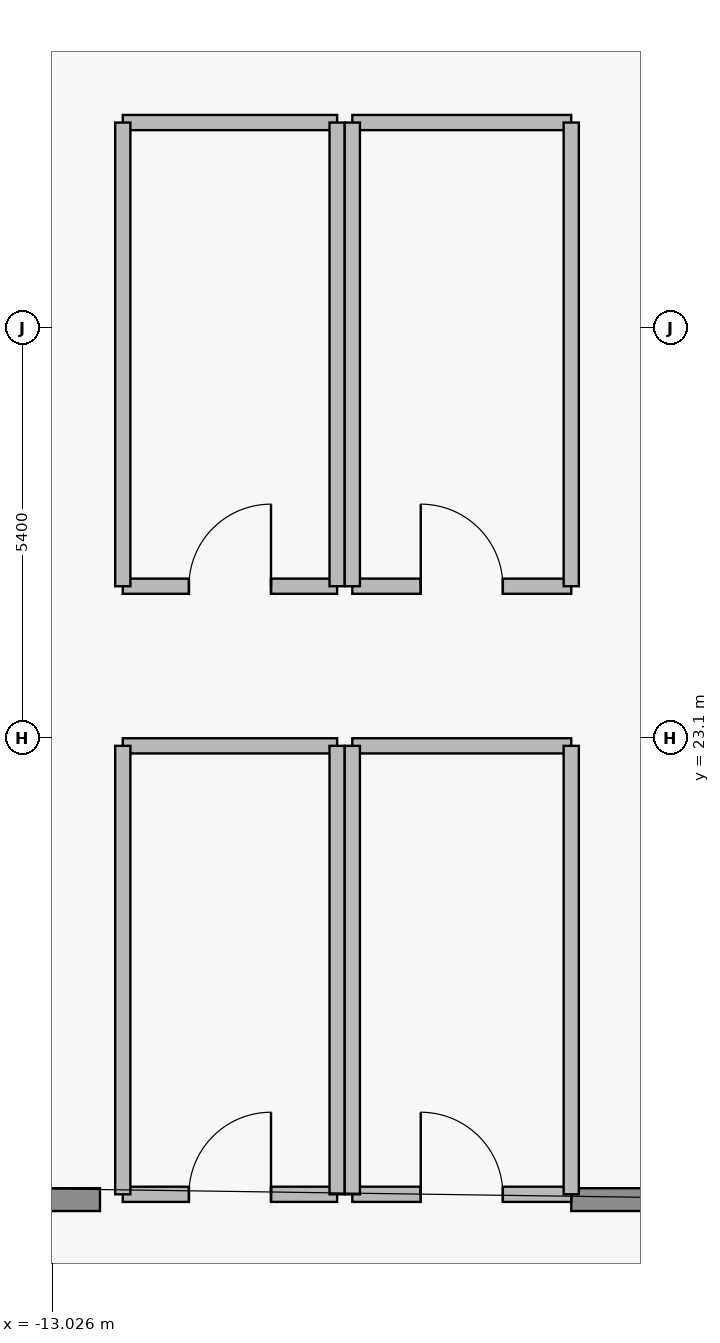
"""IFC4 building model, lengths in metres.
Left out: names, types, materials, properties, quantities, classifications, styles, units other than length and angle.
Written with IfcOpenShell. Run it as: python <this file> out.ifc"""

import sys

from ifc_helpers import new_model, si_unit, direction, frame, frame_2d, origin, place, context, subcontext, project, spatial, rectangle, extrude, element, fill, save


model = new_model("IFC4")
c1 = context("Model", 3, precision=1e-05, world=origin(), true_north=direction((0.0, 1.0)))
c2 = subcontext(c1, "Body", "Model", "MODEL_VIEW")
j1 = project(units=[si_unit("LENGTHUNIT", "METRE"), si_unit("PLANEANGLEUNIT", "RADIAN")], contexts=[c1])
p1 = place(None, origin())
s1 = spatial("IfcSite", under=j1, at=p1, CompositionType="ELEMENT")
p2 = place(p1, origin())
s2 = spatial("IfcBuilding", under=s1, at=p2, CompositionType="ELEMENT")
p3 = place(p2, frame((0.0, 0.0, 233.65)))
s3 = spatial("IfcBuildingStorey", under=s2, at=p3, CompositionType="ELEMENT", Elevation=233.65)
p4 = place(p3, frame((-15.5, 17.03, 0.0), z_axis=(0.0, 0.0, 1.0), x_axis=(1.0, 0.0, 0.0)))
e1 = element("IfcWall", 1, at=p4, inside=s3, PredefinedType="STANDARD", context=c2, shape_type="SweptSolid", body=[
    extrude(rectangle(XDim=3.1, YDim=0.3, at=frame_2d((1.55, 0.0))), origin(), (0.0, 0.0, 1.0), 5.74),
])
p5 = place(p3, frame((-6.2, 17.03, 0.0), z_axis=(0.0, 0.0, 1.0), x_axis=(1.0, 0.0, 0.0)))
e2 = element("IfcWall", 2, at=p5, inside=s3, PredefinedType="STANDARD", context=c2, shape_type="SweptSolid", body=[
    extrude(rectangle(XDim=5.15, YDim=0.3, at=frame_2d((2.575, 0.0))), origin(), (0.0, 0.0, 1.0), 5.74),
])
p6 = place(p5, frame((2.5, 0.0, 0.0)))
e3 = element("IfcOpeningElement", 3, at=p6, cuts=e2, PredefinedType="OPENING", context=c2, shape_type="SweptSolid", body=[
    extrude(rectangle(XDim=1.2, YDim=2.2, at=frame_2d((0.6, 1.1))), frame((0.0, 0.16, 0.0), z_axis=(0.0, -1.0, 0.0), x_axis=(1.0, 0.0, 0.0)), (0.0, 0.0, 1.0), 0.32),
])
p7 = place(p3, frame((-12.1, 17.1, 0.0), z_axis=(0.0, 0.0, 1.0), x_axis=(1.0, 0.0, 0.0)))
e4 = element("IfcWall", 4, at=p7, inside=s3, PredefinedType="PARTITIONING", context=c2, shape_type="SweptSolid", body=[
    extrude(rectangle(XDim=2.82, YDim=0.2, at=frame_2d((1.41, 0.0))), origin(), (0.0, 0.0, 1.0), 5.74),
])
p8 = place(p7, frame((0.87, 0.0, 0.0)))
e5 = element("IfcOpeningElement", 5, at=p8, cuts=e4, PredefinedType="OPENING", context=c2, shape_type="SweptSolid", body=[
    extrude(rectangle(XDim=1.08, YDim=2.18, at=frame_2d((0.54, 1.09))), frame((0.0, 0.11, 0.0), z_axis=(0.0, -1.0, 0.0), x_axis=(1.0, 0.0, 0.0)), (0.0, 0.0, 1.0), 0.22),
])
p9 = place(p3, frame((-9.08, 17.1, 0.0), z_axis=(0.0, 0.0, 1.0), x_axis=(1.0, 0.0, 0.0)))
e6 = element("IfcWall", 6, at=p9, inside=s3, PredefinedType="PARTITIONING", context=c2, shape_type="SweptSolid", body=[
    extrude(rectangle(XDim=2.88, YDim=0.2, at=frame_2d((1.44, 0.0))), origin(), (0.0, 0.0, 1.0), 5.74),
])
p10 = place(p9, frame((0.9, 0.0, 0.0)))
e7 = element("IfcOpeningElement", 7, at=p10, cuts=e6, PredefinedType="OPENING", context=c2, shape_type="SweptSolid", body=[
    extrude(rectangle(XDim=1.08, YDim=2.18, at=frame_2d((0.54, 1.09))), frame((0.0, 0.11, 0.0), z_axis=(0.0, -1.0, 0.0), x_axis=(1.0, 0.0, 0.0)), (0.0, 0.0, 1.0), 0.22),
])
p11 = place(p3, frame((-12.1, 25.1, 0.0), z_axis=(0.0, 0.0, 1.0), x_axis=(1.0, 0.0, 0.0)))
e8 = element("IfcWall", 8, at=p11, inside=s3, PredefinedType="PARTITIONING", context=c2, shape_type="SweptSolid", body=[
    extrude(rectangle(XDim=2.82, YDim=0.2, at=frame_2d((1.41, 0.0))), origin(), (0.0, 0.0, 1.0), 5.336),
])
p12 = place(p11, frame((0.87, 0.0, 0.0)))
e9 = element("IfcOpeningElement", 9, at=p12, cuts=e8, PredefinedType="OPENING", context=c2, shape_type="SweptSolid", body=[
    extrude(rectangle(XDim=1.08, YDim=2.18, at=frame_2d((0.54, 1.09))), frame((0.0, 0.11, 0.0), z_axis=(0.0, -1.0, 0.0), x_axis=(1.0, 0.0, 0.0)), (0.0, 0.0, 1.0), 0.22),
])
p13 = place(p3, frame((-9.08, 25.1, 0.0), z_axis=(0.0, 0.0, 1.0), x_axis=(1.0, 0.0, 0.0)))
e10 = element("IfcWall", 10, at=p13, inside=s3, PredefinedType="PARTITIONING", context=c2, shape_type="SweptSolid", body=[
    extrude(rectangle(XDim=2.88, YDim=0.2, at=frame_2d((1.44, 0.0))), origin(), (0.0, 0.0, 1.0), 5.336),
])
p14 = place(p13, frame((0.9, 0.0, 0.0)))
e11 = element("IfcOpeningElement", 11, at=p14, cuts=e10, PredefinedType="OPENING", context=c2, shape_type="SweptSolid", body=[
    extrude(rectangle(XDim=1.08, YDim=2.18, at=frame_2d((0.54, 1.09))), frame((0.0, 0.11, 0.0), z_axis=(0.0, -1.0, 0.0), x_axis=(1.0, 0.0, 0.0)), (0.0, 0.0, 1.0), 0.22),
])
p15 = place(p3, frame((-12.1, 23.0, 0.0), z_axis=(0.0, 0.0, 1.0), x_axis=(1.0, 0.0, 0.0)))
e12 = element("IfcWall", 12, at=p15, inside=s3, PredefinedType="PARTITIONING", context=c2, shape_type="SweptSolid", body=[
    extrude(rectangle(XDim=2.82, YDim=0.2, at=frame_2d((1.41, 0.0))), origin(), (0.0, 0.0, 1.0), 5.74),
])
for number, where, z_axis, x_axis in (
    (13, (-12.1, 17.1, 0.0), (0.0, 0.0, 1.0), (0.0, 1.0, 0.0)),
    (14, (-9.28, 17.1, 0.0), (0.0, 0.0, 1.0), (0.0, 1.0, 0.0)),
):
    element("IfcWall", number, at=place(p3, frame(where, z_axis=z_axis, x_axis=x_axis)), inside=s3, PredefinedType="PARTITIONING", context=c2, shape_type="SweptSolid", body=[
        extrude(rectangle(XDim=5.9, YDim=0.2, at=frame_2d((2.95, 0.0))), origin(), (0.0, 0.0, 1.0), 5.74),
    ])
p16 = place(p3, frame((-9.08, 23.0, 0.0), z_axis=(0.0, 0.0, 1.0), x_axis=(1.0, 0.0, 0.0)))
e15 = element("IfcWall", 15, at=p16, inside=s3, PredefinedType="PARTITIONING", context=c2, shape_type="SweptSolid", body=[
    extrude(rectangle(XDim=2.88, YDim=0.2, at=frame_2d((1.44, 0.0))), origin(), (0.0, 0.0, 1.0), 5.74),
])
for number, where, z_axis, x_axis in (
    (16, (-9.08, 17.1, 0.0), (0.0, 0.0, 1.0), (0.0, 1.0, 0.0)),
    (17, (-6.2, 17.1, 0.0), (0.0, 0.0, 1.0), (0.0, 1.0, 0.0)),
):
    element("IfcWall", number, at=place(p3, frame(where, z_axis=z_axis, x_axis=x_axis)), inside=s3, PredefinedType="PARTITIONING", context=c2, shape_type="SweptSolid", body=[
        extrude(rectangle(XDim=5.9, YDim=0.2, at=frame_2d((2.95, 0.0))), origin(), (0.0, 0.0, 1.0), 5.74),
    ])
p17 = place(p3, frame((-12.1, 31.2, 0.0), z_axis=(0.0, 0.0, 1.0), x_axis=(1.0, 0.0, 0.0)))
e18 = element("IfcWall", 18, at=p17, inside=s3, PredefinedType="PARTITIONING", context=c2, shape_type="SweptSolid", body=[
    extrude(rectangle(XDim=2.82, YDim=0.2, at=frame_2d((1.41, 0.0))), origin(), (0.0, 0.0, 1.0), 5.74),
])
for number, where, z_axis, x_axis in (
    (19, (-12.1, 25.1, 0.0), (0.0, 0.0, 1.0), (0.0, 1.0, 0.0)),
    (20, (-9.28, 25.1, 0.0), (0.0, 0.0, 1.0), (0.0, 1.0, 0.0)),
):
    element("IfcWall", number, at=place(p3, frame(where, z_axis=z_axis, x_axis=x_axis)), inside=s3, PredefinedType="PARTITIONING", context=c2, shape_type="SweptSolid", body=[
        extrude(rectangle(XDim=6.1, YDim=0.2, at=frame_2d((3.05, 0.0))), origin(), (0.0, 0.0, 1.0), 5.74),
    ])
p18 = place(p3, frame((-9.08, 31.2, 0.0), z_axis=(0.0, 0.0, 1.0), x_axis=(1.0, 0.0, 0.0)))
e21 = element("IfcWall", 21, at=p18, inside=s3, PredefinedType="PARTITIONING", context=c2, shape_type="SweptSolid", body=[
    extrude(rectangle(XDim=2.88, YDim=0.2, at=frame_2d((1.44, 0.0))), origin(), (0.0, 0.0, 1.0), 5.74),
])
for number, where, z_axis, x_axis in (
    (22, (-9.08, 25.1, 0.0), (0.0, 0.0, 1.0), (0.0, 1.0, 0.0)),
    (23, (-6.2, 25.1, 0.0), (0.0, 0.0, 1.0), (0.0, 1.0, 0.0)),
):
    element("IfcWall", number, at=place(p3, frame(where, z_axis=z_axis, x_axis=x_axis)), inside=s3, PredefinedType="PARTITIONING", context=c2, shape_type="SweptSolid", body=[
        extrude(rectangle(XDim=6.1, YDim=0.2, at=frame_2d((3.05, 0.0))), origin(), (0.0, 0.0, 1.0), 5.74),
    ])
p19 = place(p8, origin())
e24 = element("IfcDoor", 24, at=p19, inside=s3, OperationType="SINGLE_SWING_RIGHT", PredefinedType="DOOR", context=c2, shape_type="SweptSolid", body=[
    extrude(rectangle(XDim=1.08, YDim=2.18, at=frame_2d((0.54, 1.09))), frame((0.0, 0.025, 0.0), z_axis=(0.0, -1.0, 0.0), x_axis=(1.0, 0.0, 0.0)), (0.0, 0.0, 1.0), 0.05),
])
fill(e5, e24)
p20 = place(p10, origin())
e25 = element("IfcDoor", 25, at=p20, inside=s3, OperationType="SINGLE_SWING_LEFT", PredefinedType="DOOR", context=c2, shape_type="SweptSolid", body=[
    extrude(rectangle(XDim=1.08, YDim=2.18, at=frame_2d((0.54, 1.09))), frame((0.0, 0.025, 0.0), z_axis=(0.0, -1.0, 0.0), x_axis=(1.0, 0.0, 0.0)), (0.0, 0.0, 1.0), 0.05),
])
fill(e7, e25)
p21 = place(p12, origin())
e26 = element("IfcDoor", 26, at=p21, inside=s3, OperationType="SINGLE_SWING_RIGHT", PredefinedType="DOOR", context=c2, shape_type="SweptSolid", body=[
    extrude(rectangle(XDim=1.08, YDim=2.18, at=frame_2d((0.54, 1.09))), frame((0.0, 0.025, 0.0), z_axis=(0.0, -1.0, 0.0), x_axis=(1.0, 0.0, 0.0)), (0.0, 0.0, 1.0), 0.05),
])
fill(e9, e26)
p22 = place(p14, origin())
e27 = element("IfcDoor", 27, at=p22, inside=s3, OperationType="SINGLE_SWING_LEFT", PredefinedType="DOOR", context=c2, shape_type="SweptSolid", body=[
    extrude(rectangle(XDim=1.08, YDim=2.18, at=frame_2d((0.54, 1.09))), frame((0.0, 0.025, 0.0), z_axis=(0.0, -1.0, 0.0), x_axis=(1.0, 0.0, 0.0)), (0.0, 0.0, 1.0), 0.05),
])
fill(e11, e27)
save(model, sys.argv[1])
